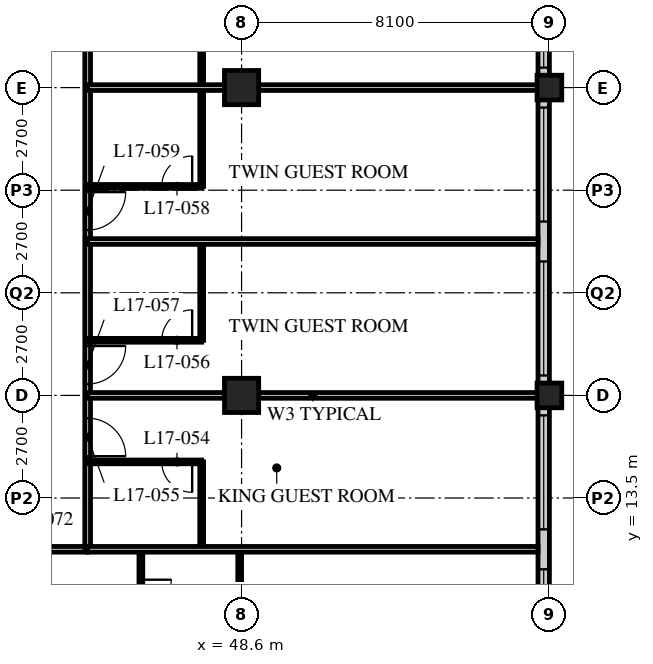
"""IFC4 building model, lengths in metres.
Left out: names, types, materials, properties, quantities, classifications, styles, units other than length and angle.
Written with IfcOpenShell. Run it as: python <this file> out.ifc"""

import sys

from ifc_helpers import new_model, si_unit, direction, frame, frame_2d, origin, origin_2d, place, context, subcontext, project, spatial, rectangle, hollow_rectangle, extrude, element, fill, save


model = new_model("IFC4")
c1 = context("Model", 3, precision=1e-05, world=origin(), true_north=direction((0.0, 1.0)))
c2 = subcontext(c1, "Body", "Model", "MODEL_VIEW")
j1 = project(units=[si_unit("LENGTHUNIT", "METRE"), si_unit("PLANEANGLEUNIT", "RADIAN")], contexts=[c1])
p1 = place(None, origin())
s1 = spatial("IfcSite", under=j1, at=p1, CompositionType="ELEMENT")
p2 = place(p1, origin())
s2 = spatial("IfcBuilding", under=s1, at=p2, CompositionType="ELEMENT")
p3 = place(p2, frame((0.0, 0.0, 70.4)))
s3 = spatial("IfcBuildingStorey", under=s2, at=p3, CompositionType="ELEMENT", Elevation=70.4)
for number, where, z_axis, x_axis in (
    (1, (48.6, 16.2, 0.0), (0.0, 0.0, 1.0), (1.0, 0.0, 0.0)),
    (2, (48.6, 24.3, 0.0), (0.0, 0.0, 1.0), (1.0, 0.0, 0.0)),
):
    element("IfcColumn", number, at=place(p3, frame(where, z_axis=z_axis, x_axis=x_axis)), inside=s3, PredefinedType="COLUMN", context=c2, shape_type="SweptSolid", body=[
        extrude(hollow_rectangle(XDim=0.9, YDim=0.9, WallThickness=0.09, at=origin_2d()), origin(), (0.0, 0.0, 1.0), 3.4),
    ])
for number, where, z_axis, x_axis in (
    (3, (56.7, 16.2, 0.0), (0.0, 0.0, 1.0), (1.0, 0.0, 0.0)),
    (4, (56.7, 24.3, 0.0), (0.0, 0.0, 1.0), (1.0, 0.0, 0.0)),
):
    element("IfcColumn", number, at=place(p3, frame(where, z_axis=z_axis, x_axis=x_axis)), inside=s3, PredefinedType="COLUMN", context=c2, shape_type="SweptSolid", body=[
        extrude(hollow_rectangle(XDim=0.65, YDim=0.65, WallThickness=0.05, at=origin_2d()), origin(), (0.0, 0.0, 1.0), 3.4),
    ])
p4 = place(p3, frame((56.55, 8.4, 0.0), z_axis=(0.0, 0.0, 1.0), x_axis=(0.0, 1.0, 0.0)))
e5 = element("IfcWall", 5, at=p4, inside=s3, PredefinedType="SOLIDWALL", context=c2, shape_type="SweptSolid", body=[
    extrude(rectangle(XDim=32.1, YDim=0.3, at=frame_2d((16.05, 0.0))), origin(), (0.0, 0.0, 1.0), 3.19),
])
p5 = place(p4, frame((0.225, 0.0, 0.9)))
e6 = element("IfcOpeningElement", 6, at=p5, cuts=e5, PredefinedType="OPENING", context=c2, shape_type="SweptSolid", body=[
    extrude(rectangle(XDim=3.0, YDim=2.0, at=frame_2d((1.5, 1.0))), frame((0.0, 0.16, 0.0), z_axis=(0.0, -1.0, 0.0), x_axis=(1.0, 0.0, 0.0)), (0.0, 0.0, 1.0), 0.32),
])
p6 = place(p4, frame((4.275, 0.0, 0.9)))
e7 = element("IfcOpeningElement", 7, at=p6, cuts=e5, PredefinedType="OPENING", context=c2, shape_type="SweptSolid", body=[
    extrude(rectangle(XDim=3.0, YDim=2.0, at=frame_2d((1.5, 1.0))), frame((0.0, 0.16, 0.0), z_axis=(0.0, -1.0, 0.0), x_axis=(1.0, 0.0, 0.0)), (0.0, 0.0, 1.0), 0.32),
])
p7 = place(p4, frame((8.325, 0.0, 0.9)))
e8 = element("IfcOpeningElement", 8, at=p7, cuts=e5, PredefinedType="OPENING", context=c2, shape_type="SweptSolid", body=[
    extrude(rectangle(XDim=3.0, YDim=2.0, at=frame_2d((1.5, 1.0))), frame((0.0, 0.16, 0.0), z_axis=(0.0, -1.0, 0.0), x_axis=(1.0, 0.0, 0.0)), (0.0, 0.0, 1.0), 0.32),
])
p8 = place(p4, frame((12.375, 0.0, 0.9)))
e9 = element("IfcOpeningElement", 9, at=p8, cuts=e5, PredefinedType="OPENING", context=c2, shape_type="SweptSolid", body=[
    extrude(rectangle(XDim=3.0, YDim=2.0, at=frame_2d((1.5, 1.0))), frame((0.0, 0.16, 0.0), z_axis=(0.0, -1.0, 0.0), x_axis=(1.0, 0.0, 0.0)), (0.0, 0.0, 1.0), 0.32),
])
p9 = place(p4, frame((16.425, 0.0, 0.9)))
e10 = element("IfcOpeningElement", 10, at=p9, cuts=e5, PredefinedType="OPENING", context=c2, shape_type="SweptSolid", body=[
    extrude(rectangle(XDim=3.0, YDim=2.0, at=frame_2d((1.5, 1.0))), frame((0.0, 0.16, 0.0), z_axis=(0.0, -1.0, 0.0), x_axis=(1.0, 0.0, 0.0)), (0.0, 0.0, 1.0), 0.32),
])
p10 = place(p4, frame((20.475, 0.0, 0.9)))
e11 = element("IfcOpeningElement", 11, at=p10, cuts=e5, PredefinedType="OPENING", context=c2, shape_type="SweptSolid", body=[
    extrude(rectangle(XDim=3.0, YDim=2.0, at=frame_2d((1.5, 1.0))), frame((0.0, 0.16, 0.0), z_axis=(0.0, -1.0, 0.0), x_axis=(1.0, 0.0, 0.0)), (0.0, 0.0, 1.0), 0.32),
])
p11 = place(p4, frame((24.525, 0.0, 0.9)))
e12 = element("IfcOpeningElement", 12, at=p11, cuts=e5, PredefinedType="OPENING", context=c2, shape_type="SweptSolid", body=[
    extrude(rectangle(XDim=3.0, YDim=2.0, at=frame_2d((1.5, 1.0))), frame((0.0, 0.16, 0.0), z_axis=(0.0, -1.0, 0.0), x_axis=(1.0, 0.0, 0.0)), (0.0, 0.0, 1.0), 0.32),
])
p12 = place(p4, frame((28.575, 0.0, 0.9)))
e13 = element("IfcOpeningElement", 13, at=p12, cuts=e5, PredefinedType="OPENING", context=c2, shape_type="SweptSolid", body=[
    extrude(rectangle(XDim=3.0, YDim=2.0, at=frame_2d((1.5, 1.0))), frame((0.0, 0.16, 0.0), z_axis=(0.0, -1.0, 0.0), x_axis=(1.0, 0.0, 0.0)), (0.0, 0.0, 1.0), 0.32),
])
p13 = place(p3, frame((8.1, 12.15, 0.0), z_axis=(0.0, 0.0, 1.0), x_axis=(1.0, 0.0, 0.0)))
e14 = element("IfcWall", 14, at=p13, inside=s3, PredefinedType="PARTITIONING", context=c2, shape_type="SweptSolid", body=[
    extrude(rectangle(XDim=36.45, YDim=0.15, at=frame_2d((18.225, 0.0))), origin(), (0.0, 0.0, 1.0), 3.19),
])
p14 = place(p13, frame((4.35, 0.0, 0.0)))
e15 = element("IfcOpeningElement", 15, at=p14, cuts=e14, PredefinedType="OPENING", context=c2, shape_type="SweptSolid", body=[
    extrude(rectangle(XDim=1.0, YDim=2.1, at=frame_2d((0.5, 1.05))), frame((0.0, 0.085, 0.0), z_axis=(0.0, -1.0, 0.0), x_axis=(1.0, 0.0, 0.0)), (0.0, 0.0, 1.0), 0.17),
])
p15 = place(p13, frame((10.55, 0.0, 0.0)))
e16 = element("IfcOpeningElement", 16, at=p15, cuts=e14, PredefinedType="OPENING", context=c2, shape_type="SweptSolid", body=[
    extrude(rectangle(XDim=1.0, YDim=2.1, at=frame_2d((0.5, 1.05))), frame((0.0, 0.085, 0.0), z_axis=(0.0, -1.0, 0.0), x_axis=(1.0, 0.0, 0.0)), (0.0, 0.0, 1.0), 0.17),
])
p16 = place(p13, frame((14.6, 0.0, 0.0)))
e17 = element("IfcOpeningElement", 17, at=p16, cuts=e14, PredefinedType="OPENING", context=c2, shape_type="SweptSolid", body=[
    extrude(rectangle(XDim=1.0, YDim=2.1, at=frame_2d((0.5, 1.05))), frame((0.0, 0.085, 0.0), z_axis=(0.0, -1.0, 0.0), x_axis=(1.0, 0.0, 0.0)), (0.0, 0.0, 1.0), 0.17),
])
p17 = place(p13, frame((18.65, 0.0, 0.0)))
e18 = element("IfcOpeningElement", 18, at=p17, cuts=e14, PredefinedType="OPENING", context=c2, shape_type="SweptSolid", body=[
    extrude(rectangle(XDim=1.0, YDim=2.1, at=frame_2d((0.5, 1.05))), frame((0.0, 0.085, 0.0), z_axis=(0.0, -1.0, 0.0), x_axis=(1.0, 0.0, 0.0)), (0.0, 0.0, 1.0), 0.17),
])
p18 = place(p13, frame((22.7, 0.0, 0.0)))
e19 = element("IfcOpeningElement", 19, at=p18, cuts=e14, PredefinedType="OPENING", context=c2, shape_type="SweptSolid", body=[
    extrude(rectangle(XDim=1.0, YDim=2.1, at=frame_2d((0.5, 1.05))), frame((0.0, 0.085, 0.0), z_axis=(0.0, -1.0, 0.0), x_axis=(1.0, 0.0, 0.0)), (0.0, 0.0, 1.0), 0.17),
])
p19 = place(p13, frame((24.6, 0.0, 0.0)))
e20 = element("IfcOpeningElement", 20, at=p19, cuts=e14, PredefinedType="OPENING", context=c2, shape_type="SweptSolid", body=[
    extrude(rectangle(XDim=1.0, YDim=2.1, at=frame_2d((0.5, 1.05))), frame((0.0, 0.085, 0.0), z_axis=(0.0, -1.0, 0.0), x_axis=(1.0, 0.0, 0.0)), (0.0, 0.0, 1.0), 0.17),
])
p20 = place(p13, frame((30.8, 0.0, 0.0)))
e21 = element("IfcOpeningElement", 21, at=p20, cuts=e14, PredefinedType="OPENING", context=c2, shape_type="SweptSolid", body=[
    extrude(rectangle(XDim=1.0, YDim=2.1, at=frame_2d((0.5, 1.05))), frame((0.0, 0.085, 0.0), z_axis=(0.0, -1.0, 0.0), x_axis=(1.0, 0.0, 0.0)), (0.0, 0.0, 1.0), 0.17),
])
p21 = place(p13, frame((1.525, 0.0, 0.0)))
e22 = element("IfcOpeningElement", 22, at=p21, cuts=e14, PredefinedType="OPENING", context=c2, shape_type="SweptSolid", body=[
    extrude(rectangle(XDim=1.0, YDim=2.1, at=frame_2d((0.5, 1.05))), frame((0.0, 0.085, 0.0), z_axis=(0.0, -1.0, 0.0), x_axis=(1.0, 0.0, 0.0)), (0.0, 0.0, 1.0), 0.17),
])
p22 = place(p13, frame((33.925, 0.0, 0.0)))
e23 = element("IfcOpeningElement", 23, at=p22, cuts=e14, PredefinedType="OPENING", context=c2, shape_type="SweptSolid", body=[
    extrude(rectangle(XDim=1.0, YDim=2.1, at=frame_2d((0.5, 1.05))), frame((0.0, 0.085, 0.0), z_axis=(0.0, -1.0, 0.0), x_axis=(1.0, 0.0, 0.0)), (0.0, 0.0, 1.0), 0.17),
])
p23 = place(p3, frame((44.55, 12.15, 0.0), z_axis=(0.0, 0.0, 1.0), x_axis=(0.0, 1.0, 0.0)))
e24 = element("IfcWall", 24, at=p23, inside=s3, PredefinedType="PARTITIONING", context=c2, shape_type="SweptSolid", body=[
    extrude(rectangle(XDim=30.15, YDim=0.15, at=frame_2d((15.075, 0.0))), origin(), (0.0, 0.0, 1.0), 3.19),
])
p24 = place(p23, frame((2.45, 0.0, 0.0)))
e25 = element("IfcOpeningElement", 25, at=p24, cuts=e24, PredefinedType="OPENING", context=c2, shape_type="SweptSolid", body=[
    extrude(rectangle(XDim=1.0, YDim=2.1, at=frame_2d((0.5, 1.05))), frame((0.0, 0.085, 0.0), z_axis=(0.0, -1.0, 0.0), x_axis=(1.0, 0.0, 0.0)), (0.0, 0.0, 1.0), 0.17),
])
p25 = place(p23, frame((4.35, 0.0, 0.0)))
e26 = element("IfcOpeningElement", 26, at=p25, cuts=e24, PredefinedType="OPENING", context=c2, shape_type="SweptSolid", body=[
    extrude(rectangle(XDim=1.0, YDim=2.1, at=frame_2d((0.5, 1.05))), frame((0.0, 0.085, 0.0), z_axis=(0.0, -1.0, 0.0), x_axis=(1.0, 0.0, 0.0)), (0.0, 0.0, 1.0), 0.17),
])
p26 = place(p23, frame((8.4, 0.0, 0.0)))
e27 = element("IfcOpeningElement", 27, at=p26, cuts=e24, PredefinedType="OPENING", context=c2, shape_type="SweptSolid", body=[
    extrude(rectangle(XDim=1.0, YDim=2.1, at=frame_2d((0.5, 1.05))), frame((0.0, 0.085, 0.0), z_axis=(0.0, -1.0, 0.0), x_axis=(1.0, 0.0, 0.0)), (0.0, 0.0, 1.0), 0.17),
])
p27 = place(p23, frame((14.6, 0.0, 0.0)))
e28 = element("IfcOpeningElement", 28, at=p27, cuts=e24, PredefinedType="OPENING", context=c2, shape_type="SweptSolid", body=[
    extrude(rectangle(XDim=1.0, YDim=2.1, at=frame_2d((0.5, 1.05))), frame((0.0, 0.085, 0.0), z_axis=(0.0, -1.0, 0.0), x_axis=(1.0, 0.0, 0.0)), (0.0, 0.0, 1.0), 0.17),
])
p28 = place(p23, frame((21.65, 0.0, 0.0)))
e29 = element("IfcOpeningElement", 29, at=p28, cuts=e24, PredefinedType="OPENING", context=c2, shape_type="SweptSolid", body=[
    extrude(rectangle(XDim=1.0, YDim=2.1, at=frame_2d((0.5, 1.05))), frame((0.0, 0.085, 0.0), z_axis=(0.0, -1.0, 0.0), x_axis=(1.0, 0.0, 0.0)), (0.0, 0.0, 1.0), 0.17),
])
p29 = place(p23, frame((26.7, 0.0, 0.0)))
e30 = element("IfcOpeningElement", 30, at=p29, cuts=e24, PredefinedType="OPENING", context=c2, shape_type="SweptSolid", body=[
    extrude(rectangle(XDim=1.0, YDim=2.1, at=frame_2d((0.5, 1.05))), frame((0.0, 0.085, 0.0), z_axis=(0.0, -1.0, 0.0), x_axis=(1.0, 0.0, 0.0)), (0.0, 0.0, 1.0), 0.17),
])
p30 = place(p3, frame((47.55, 12.15, 0.0), z_axis=(0.0, 0.0, 1.0), x_axis=(0.0, 1.0, 0.0)))
e31 = element("IfcWall", 31, at=p30, inside=s3, PredefinedType="PARTITIONING", context=c2, shape_type="SweptSolid", body=[
    extrude(rectangle(XDim=2.3, YDim=0.1, at=frame_2d((1.15, 0.0))), origin(), (0.0, 0.0, 1.0), 3.19),
])
p31 = place(p3, frame((44.55, 14.45, 0.0), z_axis=(0.0, 0.0, 1.0), x_axis=(1.0, 0.0, 0.0)))
e32 = element("IfcWall", 32, at=p31, inside=s3, PredefinedType="PARTITIONING", context=c2, shape_type="SweptSolid", body=[
    extrude(rectangle(XDim=3.0, YDim=0.1, at=frame_2d((1.5, 0.0))), origin(), (0.0, 0.0, 1.0), 3.19),
])
p32 = place(p31, frame((1.95, 0.0, 0.0)))
e33 = element("IfcOpeningElement", 33, at=p32, cuts=e32, PredefinedType="OPENING", context=c2, shape_type="SweptSolid", body=[
    extrude(rectangle(XDim=0.8, YDim=2.1, at=frame_2d((0.4, 1.05))), frame((0.0, 0.06, 0.0), z_axis=(0.0, -1.0, 0.0), x_axis=(1.0, 0.0, 0.0)), (0.0, 0.0, 1.0), 0.12),
])
p33 = place(p3, frame((44.55, 16.2, 0.0), z_axis=(0.0, 0.0, 1.0), x_axis=(1.0, 0.0, 0.0)))
e34 = element("IfcWall", 34, at=p33, inside=s3, PredefinedType="PARTITIONING", context=c2, shape_type="SweptSolid", body=[
    extrude(rectangle(XDim=11.85, YDim=0.15, at=frame_2d((5.925, 0.0))), origin(), (0.0, 0.0, 1.0), 2.578),
])
p34 = place(p3, frame((47.55, 17.65, 0.0), z_axis=(0.0, 0.0, 1.0), x_axis=(0.0, 1.0, 0.0)))
e35 = element("IfcWall", 35, at=p34, inside=s3, PredefinedType="PARTITIONING", context=c2, shape_type="SweptSolid", body=[
    extrude(rectangle(XDim=2.6, YDim=0.1, at=frame_2d((1.3, 0.0))), origin(), (0.0, 0.0, 1.0), 3.19),
])
p35 = place(p3, frame((44.55, 17.65, 0.0), z_axis=(0.0, 0.0, 1.0), x_axis=(1.0, 0.0, 0.0)))
e36 = element("IfcWall", 36, at=p35, inside=s3, PredefinedType="PARTITIONING", context=c2, shape_type="SweptSolid", body=[
    extrude(rectangle(XDim=3.0, YDim=0.1, at=frame_2d((1.5, 0.0))), origin(), (0.0, 0.0, 1.0), 3.19),
])
p36 = place(p35, frame((1.95, 0.0, 0.0)))
e37 = element("IfcOpeningElement", 37, at=p36, cuts=e36, PredefinedType="OPENING", context=c2, shape_type="SweptSolid", body=[
    extrude(rectangle(XDim=0.8, YDim=2.1, at=frame_2d((0.4, 1.05))), frame((0.0, 0.06, 0.0), z_axis=(0.0, -1.0, 0.0), x_axis=(1.0, 0.0, 0.0)), (0.0, 0.0, 1.0), 0.12),
])
p37 = place(p3, frame((44.55, 20.25, 0.0), z_axis=(0.0, 0.0, 1.0), x_axis=(1.0, 0.0, 0.0)))
e38 = element("IfcWall", 38, at=p37, inside=s3, PredefinedType="PARTITIONING", context=c2, shape_type="SweptSolid", body=[
    extrude(rectangle(XDim=11.85, YDim=0.15, at=frame_2d((5.925, 0.0))), origin(), (0.0, 0.0, 1.0), 3.19),
])
p38 = place(p3, frame((47.55, 21.7, 0.0), z_axis=(0.0, 0.0, 1.0), x_axis=(0.0, 1.0, 0.0)))
e39 = element("IfcWall", 39, at=p38, inside=s3, PredefinedType="PARTITIONING", context=c2, shape_type="SweptSolid", body=[
    extrude(rectangle(XDim=4.9, YDim=0.1, at=frame_2d((2.45, 0.0))), origin(), (0.0, 0.0, 1.0), 3.19),
])
p39 = place(p3, frame((44.55, 21.7, 0.0), z_axis=(0.0, 0.0, 1.0), x_axis=(1.0, 0.0, 0.0)))
e40 = element("IfcWall", 40, at=p39, inside=s3, PredefinedType="PARTITIONING", context=c2, shape_type="SweptSolid", body=[
    extrude(rectangle(XDim=3.0, YDim=0.1, at=frame_2d((1.5, 0.0))), origin(), (0.0, 0.0, 1.0), 3.19),
])
p40 = place(p39, frame((1.95, 0.0, 0.0)))
e41 = element("IfcOpeningElement", 41, at=p40, cuts=e40, PredefinedType="OPENING", context=c2, shape_type="SweptSolid", body=[
    extrude(rectangle(XDim=0.8, YDim=2.1, at=frame_2d((0.4, 1.05))), frame((0.0, 0.06, 0.0), z_axis=(0.0, -1.0, 0.0), x_axis=(1.0, 0.0, 0.0)), (0.0, 0.0, 1.0), 0.12),
])
p41 = place(p3, frame((44.55, 24.3, 0.0), z_axis=(0.0, 0.0, 1.0), x_axis=(1.0, 0.0, 0.0)))
e42 = element("IfcWall", 42, at=p41, inside=s3, PredefinedType="PARTITIONING", context=c2, shape_type="SweptSolid", body=[
    extrude(rectangle(XDim=11.85, YDim=0.15, at=frame_2d((5.925, 0.0))), origin(), (0.0, 0.0, 1.0), 2.578),
])
p42 = place(p3, frame((45.95, 12.15, 0.0), z_axis=(0.0, 0.0, 1.0), x_axis=(0.0, -1.0, 0.0)))
e43 = element("IfcWall", 43, at=p42, inside=s3, PredefinedType="PARTITIONING", context=c2, shape_type="SweptSolid", body=[
    extrude(rectangle(XDim=2.4, YDim=0.1, at=frame_2d((1.2, 0.0))), origin(), (0.0, 0.0, 1.0), 3.19),
])
p43 = place(p42, frame((0.8, 0.0, 0.0)))
e44 = element("IfcOpeningElement", 44, at=p43, cuts=e43, PredefinedType="OPENING", context=c2, shape_type="SweptSolid", body=[
    extrude(rectangle(XDim=0.8, YDim=2.1, at=frame_2d((0.4, 1.05))), frame((0.0, 0.06, 0.0), z_axis=(0.0, -1.0, 0.0), x_axis=(1.0, 0.0, 0.0)), (0.0, 0.0, 1.0), 0.12),
])
p44 = place(p3, frame((48.55, 12.15, 0.0), z_axis=(0.0, 0.0, 1.0), x_axis=(0.0, -1.0, 0.0)))
e45 = element("IfcWall", 45, at=p44, inside=s3, PredefinedType="PARTITIONING", context=c2, shape_type="SweptSolid", body=[
    extrude(rectangle(XDim=2.4, YDim=0.1, at=frame_2d((1.2, 0.0))), origin(), (0.0, 0.0, 1.0), 2.578),
])
p45 = place(p3, frame((44.55, 12.15, 0.0), z_axis=(0.0, 0.0, 1.0), x_axis=(1.0, 0.0, 0.0)))
e46 = element("IfcWall", 46, at=p45, inside=s3, PredefinedType="PARTITIONING", context=c2, shape_type="SweptSolid", body=[
    extrude(rectangle(XDim=11.85, YDim=0.15, at=frame_2d((5.925, 0.0))), origin(), (0.0, 0.0, 1.0), 3.19),
])
p46 = place(p5, origin())
e47 = element("IfcWindow", 47, at=p46, inside=s3, PartitioningType="SINGLE_PANEL", PredefinedType="WINDOW", context=c2, shape_type="SweptSolid", body=[
    extrude(rectangle(XDim=3.0, YDim=2.0, at=frame_2d((1.5, 1.0))), frame((0.0, 0.03, 0.0), z_axis=(0.0, -1.0, 0.0), x_axis=(1.0, 0.0, 0.0)), (0.0, 0.0, 1.0), 0.06),
])
fill(e6, e47)
p47 = place(p6, origin())
e48 = element("IfcWindow", 48, at=p47, inside=s3, PartitioningType="SINGLE_PANEL", PredefinedType="WINDOW", context=c2, shape_type="SweptSolid", body=[
    extrude(rectangle(XDim=3.0, YDim=2.0, at=frame_2d((1.5, 1.0))), frame((0.0, 0.03, 0.0), z_axis=(0.0, -1.0, 0.0), x_axis=(1.0, 0.0, 0.0)), (0.0, 0.0, 1.0), 0.06),
])
fill(e7, e48)
p48 = place(p7, origin())
e49 = element("IfcWindow", 49, at=p48, inside=s3, PartitioningType="SINGLE_PANEL", PredefinedType="WINDOW", context=c2, shape_type="SweptSolid", body=[
    extrude(rectangle(XDim=3.0, YDim=2.0, at=frame_2d((1.5, 1.0))), frame((0.0, 0.03, 0.0), z_axis=(0.0, -1.0, 0.0), x_axis=(1.0, 0.0, 0.0)), (0.0, 0.0, 1.0), 0.06),
])
fill(e8, e49)
p49 = place(p8, origin())
e50 = element("IfcWindow", 50, at=p49, inside=s3, PartitioningType="SINGLE_PANEL", PredefinedType="WINDOW", context=c2, shape_type="SweptSolid", body=[
    extrude(rectangle(XDim=3.0, YDim=2.0, at=frame_2d((1.5, 1.0))), frame((0.0, 0.03, 0.0), z_axis=(0.0, -1.0, 0.0), x_axis=(1.0, 0.0, 0.0)), (0.0, 0.0, 1.0), 0.06),
])
fill(e9, e50)
p50 = place(p9, origin())
e51 = element("IfcWindow", 51, at=p50, inside=s3, PartitioningType="SINGLE_PANEL", PredefinedType="WINDOW", context=c2, shape_type="SweptSolid", body=[
    extrude(rectangle(XDim=3.0, YDim=2.0, at=frame_2d((1.5, 1.0))), frame((0.0, 0.03, 0.0), z_axis=(0.0, -1.0, 0.0), x_axis=(1.0, 0.0, 0.0)), (0.0, 0.0, 1.0), 0.06),
])
fill(e10, e51)
p51 = place(p32, origin())
e52 = element("IfcDoor", 52, at=p51, inside=s3, OperationType="SINGLE_SWING_LEFT", PredefinedType="DOOR", context=c2, shape_type="SweptSolid", body=[
    extrude(rectangle(XDim=0.8, YDim=2.1, at=frame_2d((0.4, 1.05))), frame((0.0, 0.025, 0.0), z_axis=(0.0, -1.0, 0.0), x_axis=(1.0, 0.0, 0.0)), (0.0, 0.0, 1.0), 0.05),
])
fill(e33, e52)
p52 = place(p24, origin())
e53 = element("IfcDoor", 53, at=p52, inside=s3, OperationType="SINGLE_SWING_RIGHT", PredefinedType="DOOR", context=c2, shape_type="SweptSolid", body=[
    extrude(rectangle(XDim=1.0, YDim=2.1, at=frame_2d((0.5, 1.05))), frame((0.0, 0.025, 0.0), z_axis=(0.0, -1.0, 0.0), x_axis=(1.0, 0.0, 0.0)), (0.0, 0.0, 1.0), 0.05),
])
fill(e25, e53)
p53 = place(p36, origin())
e54 = element("IfcDoor", 54, at=p53, inside=s3, OperationType="SINGLE_SWING_RIGHT", PredefinedType="DOOR", context=c2, shape_type="SweptSolid", body=[
    extrude(rectangle(XDim=0.8, YDim=2.1, at=frame_2d((0.4, 1.05))), frame((0.0, 0.025, 0.0), z_axis=(0.0, -1.0, 0.0), x_axis=(1.0, 0.0, 0.0)), (0.0, 0.0, 1.0), 0.05),
])
fill(e37, e54)
p54 = place(p25, origin())
e55 = element("IfcDoor", 55, at=p54, inside=s3, OperationType="SINGLE_SWING_LEFT", PredefinedType="DOOR", context=c2, shape_type="SweptSolid", body=[
    extrude(rectangle(XDim=1.0, YDim=2.1, at=frame_2d((0.5, 1.05))), frame((0.0, 0.025, 0.0), z_axis=(0.0, -1.0, 0.0), x_axis=(1.0, 0.0, 0.0)), (0.0, 0.0, 1.0), 0.05),
])
fill(e26, e55)
p55 = place(p40, origin())
e56 = element("IfcDoor", 56, at=p55, inside=s3, OperationType="SINGLE_SWING_RIGHT", PredefinedType="DOOR", context=c2, shape_type="SweptSolid", body=[
    extrude(rectangle(XDim=0.8, YDim=2.1, at=frame_2d((0.4, 1.05))), frame((0.0, 0.025, 0.0), z_axis=(0.0, -1.0, 0.0), x_axis=(1.0, 0.0, 0.0)), (0.0, 0.0, 1.0), 0.05),
])
fill(e41, e56)
p56 = place(p26, origin())
e57 = element("IfcDoor", 57, at=p56, inside=s3, OperationType="SINGLE_SWING_LEFT", PredefinedType="DOOR", context=c2, shape_type="SweptSolid", body=[
    extrude(rectangle(XDim=1.0, YDim=2.1, at=frame_2d((0.5, 1.05))), frame((0.0, 0.025, 0.0), z_axis=(0.0, -1.0, 0.0), x_axis=(1.0, 0.0, 0.0)), (0.0, 0.0, 1.0), 0.05),
])
fill(e27, e57)
p57 = place(p43, origin())
e58 = element("IfcDoor", 58, at=p57, inside=s3, OperationType="SINGLE_SWING_LEFT", PredefinedType="DOOR", context=c2, shape_type="SweptSolid", body=[
    extrude(rectangle(XDim=0.8, YDim=2.1, at=frame_2d((0.4, 1.05))), frame((0.0, 0.025, 0.0), z_axis=(0.0, -1.0, 0.0), x_axis=(1.0, 0.0, 0.0)), (0.0, 0.0, 1.0), 0.05),
])
fill(e44, e58)
save(model, sys.argv[1])
